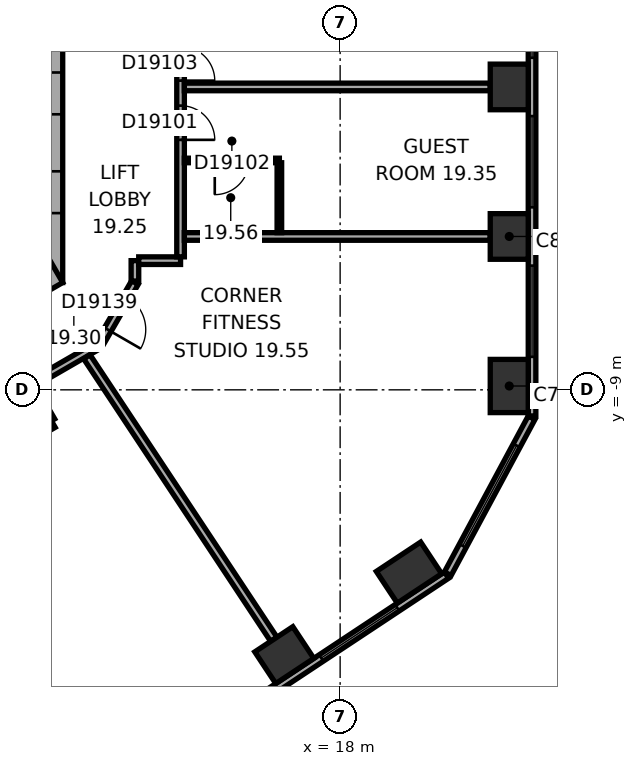
"""IFC4 building model, lengths in metres.
Left out: names, types, materials, properties, quantities, classifications, styles, units other than length and angle.
Written with IfcOpenShell. Run it as: python <this file> out.ifc"""

import sys

from ifc_helpers import new_model, si_unit, direction, frame, frame_2d, origin, origin_2d, place, context, subcontext, project, spatial, rectangle, extrude, element, fill, save


model = new_model("IFC4")
c1 = context("Model", 3, precision=1e-05, world=origin(), true_north=direction((0.0, 1.0)))
c2 = subcontext(c1, "Body", "Model", "MODEL_VIEW")
j1 = project(units=[si_unit("LENGTHUNIT", "METRE"), si_unit("PLANEANGLEUNIT", "RADIAN")], contexts=[c1])
p1 = place(None, origin())
s1 = spatial("IfcSite", under=j1, at=p1, CompositionType="ELEMENT")
p2 = place(p1, origin())
s2 = spatial("IfcBuilding", under=s1, at=p2, CompositionType="ELEMENT")
p3 = place(p2, frame((0.0, 0.0, 86.9)))
s3 = spatial("IfcBuildingStorey", under=s2, at=p3, CompositionType="ELEMENT", Elevation=86.9)
p4 = place(p3, frame((22.45, -8.899, 0.0), z_axis=(0.0, 0.0, 1.0), x_axis=(0.0, 1.0, 0.0)))
e1 = element("IfcColumn", 1, at=p4, inside=s3, PredefinedType="COLUMN", context=c2, shape_type="SweptSolid", body=[
    extrude(rectangle(XDim=1.4, YDim=1.0, at=origin_2d()), origin(), (0.0, 0.0, 1.0), 3.3),
])
for number, where, z_axis, x_axis in (
    (2, (22.45, -4.965, 0.0), (0.0, 0.0, 1.0), (0.0, 1.0, 0.0)),
    (3, (22.45, -1.03, 0.0), (0.0, 0.0, 1.0), (0.0, 1.0, 0.0)),
    (4, (16.531, -15.981, 0.0), (0.0, 0.0, 1.0), (0.834, 0.552, 0.0)),
):
    element("IfcColumn", number, at=place(p3, frame(where, z_axis=z_axis, x_axis=x_axis)), inside=s3, PredefinedType="COLUMN", context=c2, shape_type="SweptSolid", body=[
        extrude(rectangle(XDim=1.2, YDim=1.0, at=origin_2d()), origin(), (0.0, 0.0, 1.0), 3.3),
    ])
p5 = place(p3, frame((19.812, -13.809, 0.0), z_axis=(0.0, 0.0, 1.0), x_axis=(0.833885822067, 0.551936985312, 0.0)))
e5 = element("IfcColumn", 5, at=p5, inside=s3, PredefinedType="COLUMN", context=c2, shape_type="SweptSolid", body=[
    extrude(rectangle(XDim=1.4, YDim=1.0, at=origin_2d()), origin(), (0.0, 0.0, 1.0), 3.3),
])
p6 = place(p3, frame((10.1, -6.177, 0.0), z_axis=(0.0, 0.0, 1.0), x_axis=(0.0, 1.0, 0.0)))
e6 = element("IfcWall", 6, at=p6, inside=s3, PredefinedType="SHEAR", context=c2, shape_type="SweptSolid", body=[
    extrude(rectangle(XDim=12.355, YDim=1.2, at=frame_2d((6.177, 0.0))), origin(), (0.0, 0.0, 1.0), 3.3),
])
p7 = place(p6, frame((6.378, 0.0, 0.0)))
e7 = element("IfcOpeningElement", 7, at=p7, cuts=e6, PredefinedType="OPENING", context=c2, shape_type="SweptSolid", body=[
    extrude(rectangle(XDim=1.5, YDim=2.1, at=frame_2d((0.75, 1.05))), frame((0.0, 0.61, 0.0), z_axis=(0.0, -1.0, 0.0), x_axis=(1.0, 0.0, 0.0)), (0.0, 0.0, 1.0), 1.22),
])
p8 = place(p6, frame((1.828, 0.0, 0.0)))
e8 = element("IfcOpeningElement", 8, at=p8, cuts=e6, PredefinedType="OPENING", context=c2, shape_type="SweptSolid", body=[
    extrude(rectangle(XDim=1.1, YDim=2.1, at=frame_2d((0.55, 1.05))), frame((0.0, 0.61, 0.0), z_axis=(0.0, -1.0, 0.0), x_axis=(1.0, 0.0, 0.0)), (0.0, 0.0, 1.0), 1.22),
])
p9 = place(p6, frame((4.427, 0.0, 0.0)))
e9 = element("IfcOpeningElement", 9, at=p9, cuts=e6, PredefinedType="OPENING", context=c2, shape_type="SweptSolid", body=[
    extrude(rectangle(XDim=1.1, YDim=2.1, at=frame_2d((0.55, 1.05))), frame((0.0, 0.61, 0.0), z_axis=(0.0, -1.0, 0.0), x_axis=(1.0, 0.0, 0.0)), (0.0, 0.0, 1.0), 1.22),
])
p10 = place(p3, frame((-0.3, -11.836, 0.0), z_axis=(0.0, 0.0, 1.0), x_axis=(0.866021384402, 0.500006961711, 0.0)))
e10 = element("IfcWall", 10, at=p10, inside=s3, PredefinedType="SHEAR", context=c2, shape_type="SweptSolid", body=[
    extrude(rectangle(XDim=12.355, YDim=1.2, at=frame_2d((6.178, 0.0))), origin(), (0.0, 0.0, 1.0), 3.3),
])
p11 = place(p10, frame((4.128, 0.0, 0.0)))
e11 = element("IfcOpeningElement", 11, at=p11, cuts=e10, PredefinedType="OPENING", context=c2, shape_type="SweptSolid", body=[
    extrude(rectangle(XDim=0.9, YDim=2.1, at=frame_2d((0.45, 1.05))), frame((0.0, 0.61, 0.0), z_axis=(0.0, -1.0, 0.0), x_axis=(1.0, 0.0, 0.0)), (0.0, 0.0, 1.0), 1.22),
])
p12 = place(p10, frame((7.928, 0.0, 0.0)))
e12 = element("IfcOpeningElement", 12, at=p12, cuts=e10, PredefinedType="OPENING", context=c2, shape_type="SweptSolid", body=[
    extrude(rectangle(XDim=1.1, YDim=2.1, at=frame_2d((0.55, 1.05))), frame((0.0, 0.61, 0.0), z_axis=(0.0, -1.0, 0.0), x_axis=(1.0, 0.0, 0.0)), (0.0, 0.0, 1.0), 1.22),
])
p13 = place(p3, frame((23.05, -9.687, 0.0), z_axis=(0.0, 0.0, 1.0), x_axis=(0.0, 1.0, 0.0)))
e13 = element("IfcWall", 13, at=p13, inside=s3, PredefinedType="STANDARD", context=c2, shape_type="SweptSolid", body=[
    extrude(rectangle(XDim=21.246, YDim=0.2, at=frame_2d((10.623, 0.0))), origin(), (0.0, 0.0, 1.0), 3.3),
])
p14 = place(p13, frame((1.555, 0.0, 0.8)))
e14 = element("IfcOpeningElement", 14, at=p14, cuts=e13, PredefinedType="OPENING", context=c2, shape_type="SweptSolid", body=[
    extrude(rectangle(XDim=2.4, YDim=1.7, at=frame_2d((1.2, 0.85))), frame((0.0, 0.11, 0.0), z_axis=(0.0, -1.0, 0.0), x_axis=(1.0, 0.0, 0.0)), (0.0, 0.0, 1.0), 0.22),
])
p15 = place(p13, frame((5.489, 0.0, 0.8)))
e15 = element("IfcOpeningElement", 15, at=p15, cuts=e13, PredefinedType="OPENING", context=c2, shape_type="SweptSolid", body=[
    extrude(rectangle(XDim=2.4, YDim=1.7, at=frame_2d((1.2, 0.85))), frame((0.0, 0.11, 0.0), z_axis=(0.0, -1.0, 0.0), x_axis=(1.0, 0.0, 0.0)), (0.0, 0.0, 1.0), 0.22),
])
p16 = place(p13, frame((9.424, 0.0, 0.8)))
e16 = element("IfcOpeningElement", 16, at=p16, cuts=e13, PredefinedType="OPENING", context=c2, shape_type="SweptSolid", body=[
    extrude(rectangle(XDim=2.4, YDim=1.7, at=frame_2d((1.2, 0.85))), frame((0.0, 0.11, 0.0), z_axis=(0.0, -1.0, 0.0), x_axis=(1.0, 0.0, 0.0)), (0.0, 0.0, 1.0), 0.22),
])
p17 = place(p13, frame((13.358, 0.0, 0.8)))
e17 = element("IfcOpeningElement", 17, at=p17, cuts=e13, PredefinedType="OPENING", context=c2, shape_type="SweptSolid", body=[
    extrude(rectangle(XDim=2.4, YDim=1.7, at=frame_2d((1.2, 0.85))), frame((0.0, 0.11, 0.0), z_axis=(0.0, -1.0, 0.0), x_axis=(1.0, 0.0, 0.0)), (0.0, 0.0, 1.0), 0.22),
])
p18 = place(p13, frame((17.293, 0.0, 0.8)))
e18 = element("IfcOpeningElement", 18, at=p18, cuts=e13, PredefinedType="OPENING", context=c2, shape_type="SweptSolid", body=[
    extrude(rectangle(XDim=2.4, YDim=1.7, at=frame_2d((1.2, 0.85))), frame((0.0, 0.11, 0.0), z_axis=(0.0, -1.0, 0.0), x_axis=(1.0, 0.0, 0.0)), (0.0, 0.0, 1.0), 0.22),
])
p19 = place(p3, frame((3.083, -25.601, 0.0), z_axis=(0.0, 0.0, 1.0), x_axis=(0.833884295743, 0.551939291329, 0.0)))
e19 = element("IfcWall", 19, at=p19, inside=s3, PredefinedType="STANDARD", context=c2, shape_type="SweptSolid", body=[
    extrude(rectangle(XDim=21.246, YDim=0.2, at=frame_2d((10.623, 0.0))), origin(), (0.0, 0.0, 1.0), 3.3),
])
p20 = place(p19, frame((1.553, 0.0, 0.8)))
e20 = element("IfcOpeningElement", 20, at=p20, cuts=e19, PredefinedType="OPENING", context=c2, shape_type="SweptSolid", body=[
    extrude(rectangle(XDim=2.4, YDim=1.7, at=frame_2d((1.2, 0.85))), frame((0.0, 0.11, 0.0), z_axis=(0.0, -1.0, 0.0), x_axis=(1.0, 0.0, 0.0)), (0.0, 0.0, 1.0), 0.22),
])
p21 = place(p19, frame((5.488, 0.0, 0.8)))
e21 = element("IfcOpeningElement", 21, at=p21, cuts=e19, PredefinedType="OPENING", context=c2, shape_type="SweptSolid", body=[
    extrude(rectangle(XDim=2.4, YDim=1.7, at=frame_2d((1.2, 0.85))), frame((0.0, 0.11, 0.0), z_axis=(0.0, -1.0, 0.0), x_axis=(1.0, 0.0, 0.0)), (0.0, 0.0, 1.0), 0.22),
])
p22 = place(p19, frame((9.422, 0.0, 0.8)))
e22 = element("IfcOpeningElement", 22, at=p22, cuts=e19, PredefinedType="OPENING", context=c2, shape_type="SweptSolid", body=[
    extrude(rectangle(XDim=2.4, YDim=1.7, at=frame_2d((1.2, 0.85))), frame((0.0, 0.11, 0.0), z_axis=(0.0, -1.0, 0.0), x_axis=(1.0, 0.0, 0.0)), (0.0, 0.0, 1.0), 0.22),
])
p23 = place(p19, frame((13.357, 0.0, 0.8)))
e23 = element("IfcOpeningElement", 23, at=p23, cuts=e19, PredefinedType="OPENING", context=c2, shape_type="SweptSolid", body=[
    extrude(rectangle(XDim=2.4, YDim=1.7, at=frame_2d((1.2, 0.85))), frame((0.0, 0.11, 0.0), z_axis=(0.0, -1.0, 0.0), x_axis=(1.0, 0.0, 0.0)), (0.0, 0.0, 1.0), 0.22),
])
p24 = place(p19, frame((17.291, 0.0, 0.8)))
e24 = element("IfcOpeningElement", 24, at=p24, cuts=e19, PredefinedType="OPENING", context=c2, shape_type="SweptSolid", body=[
    extrude(rectangle(XDim=2.4, YDim=1.7, at=frame_2d((1.2, 0.85))), frame((0.0, 0.11, 0.0), z_axis=(0.0, -1.0, 0.0), x_axis=(1.0, 0.0, 0.0)), (0.0, 0.0, 1.0), 0.22),
])
p25 = place(p3, frame((20.833, -13.839, 0.0), z_axis=(0.0, 0.0, 1.0), x_axis=(0.473321668581, 0.880889662813, 0.0)))
e25 = element("IfcWall", 25, at=p25, inside=s3, PredefinedType="STANDARD", context=c2, shape_type="SweptSolid", body=[
    extrude(rectangle(XDim=4.66, YDim=0.2, at=frame_2d((2.33, 0.0))), origin(), (0.0, 0.0, 1.0), 3.3),
])
p26 = place(p25, frame((0.83, 0.0, 0.8)))
e26 = element("IfcOpeningElement", 26, at=p26, cuts=e25, PredefinedType="OPENING", context=c2, shape_type="SweptSolid", body=[
    extrude(rectangle(XDim=3.0, YDim=1.7, at=frame_2d((1.5, 0.85))), frame((0.0, 0.11, 0.0), z_axis=(0.0, -1.0, 0.0), x_axis=(1.0, 0.0, 0.0)), (0.0, 0.0, 1.0), 0.22),
])
p27 = place(p3, frame((7.419, -11.653, 0.0), z_axis=(0.0, 0.0, 1.0), x_axis=(0.866038154057, 0.49997791523, 0.0)))
e27 = element("IfcWall", 27, at=p27, inside=s3, PredefinedType="PARTITIONING", context=c2, shape_type="SweptSolid", body=[
    extrude(rectangle(XDim=3.502, YDim=0.2, at=frame_2d((1.751, 0.0))), origin(), (0.0, 0.0, 1.0), 3.05),
])
p28 = place(p3, frame((9.852, -8.861, 0.0), z_axis=(0.0, 0.0, 1.0), x_axis=(0.866013291437, 0.500020978615, 0.0)))
e28 = element("IfcWall", 28, at=p28, inside=s3, PredefinedType="PARTITIONING", context=c2, shape_type="SweptSolid", body=[
    extrude(rectangle(XDim=2.077, YDim=0.2, at=frame_2d((1.038, 0.0))), origin(), (0.0, 0.0, 1.0), 3.05),
])
p29 = place(p3, frame((10.402, -9.815, 0.0), z_axis=(0.0, 0.0, 1.0), x_axis=(-0.499968756647, 0.866043441391, 0.0)))
e29 = element("IfcWall", 29, at=p29, inside=s3, PredefinedType="PARTITIONING", context=c2, shape_type="SweptSolid", body=[
    extrude(rectangle(XDim=1.001, YDim=0.2, at=frame_2d((0.5, 0.0))), origin(), (0.0, 0.0, 1.0), 3.05),
])
p30 = place(p3, frame((11.67, -7.788, 0.0), z_axis=(0.0, 0.0, 1.0), x_axis=(0.500063286585, 0.865988862174, 0.0)))
e30 = element("IfcWall", 30, at=p30, inside=s3, PredefinedType="PARTITIONING", context=c2, shape_type="SweptSolid", body=[
    extrude(rectangle(XDim=1.86, YDim=0.2, at=frame_2d((0.93, 0.0))), origin(), (0.0, 0.0, 1.0), 3.05),
])
p31 = place(p30, frame((0.43, 0.0, 0.0)))
e31 = element("IfcOpeningElement", 31, at=p31, cuts=e30, PredefinedType="OPENING", context=c2, shape_type="SweptSolid", body=[
    extrude(rectangle(XDim=1.0, YDim=2.1, at=frame_2d((0.5, 1.05))), frame((0.0, 0.11, 0.0), z_axis=(0.0, -1.0, 0.0), x_axis=(1.0, 0.0, 0.0)), (0.0, 0.0, 1.0), 0.22),
])
p32 = place(p3, frame((12.6, -6.138, 0.0), z_axis=(0.0, 0.0, 1.0), x_axis=(0.0, 1.0, 0.0)))
e32 = element("IfcWall", 32, at=p32, inside=s3, PredefinedType="PARTITIONING", context=c2, shape_type="SweptSolid", body=[
    extrude(rectangle(XDim=0.537, YDim=0.2, at=frame_2d((0.268, 0.0))), origin(), (0.0, 0.0, 1.0), 3.05),
])
p33 = place(p3, frame((12.7, -5.601, 0.0), z_axis=(0.0, 0.0, 1.0), x_axis=(1.0, 0.0, 0.0)))
e33 = element("IfcWall", 33, at=p33, inside=s3, PredefinedType="PARTITIONING", context=c2, shape_type="SweptSolid", body=[
    extrude(rectangle(XDim=1.101, YDim=0.2, at=frame_2d((0.551, 0.0))), origin(), (0.0, 0.0, 1.0), 3.05),
])
p34 = place(p3, frame((13.801, -5.501, 0.0), z_axis=(0.0, 0.0, 1.0), x_axis=(0.0, 1.0, 0.0)))
e34 = element("IfcWall", 34, at=p34, inside=s3, PredefinedType="PARTITIONING", context=c2, shape_type="SweptSolid", body=[
    extrude(rectangle(XDim=5.702, YDim=0.2, at=frame_2d((2.851, 0.0))), origin(), (0.0, 0.0, 1.0), 3.05),
])
p35 = place(p34, frame((3.079, 0.0, 0.0)))
e35 = element("IfcOpeningElement", 35, at=p35, cuts=e34, PredefinedType="OPENING", context=c2, shape_type="SweptSolid", body=[
    extrude(rectangle(XDim=0.9, YDim=2.1, at=frame_2d((0.45, 1.05))), frame((0.0, 0.11, 0.0), z_axis=(0.0, -1.0, 0.0), x_axis=(1.0, 0.0, 0.0)), (0.0, 0.0, 1.0), 0.22),
])
p36 = place(p34, frame((4.636, 0.0, 0.0)))
e36 = element("IfcOpeningElement", 36, at=p36, cuts=e34, PredefinedType="OPENING", context=c2, shape_type="SweptSolid", body=[
    extrude(rectangle(XDim=0.9, YDim=2.1, at=frame_2d((0.45, 1.05))), frame((0.0, 0.11, 0.0), z_axis=(0.0, -1.0, 0.0), x_axis=(1.0, 0.0, 0.0)), (0.0, 0.0, 1.0), 0.22),
])
p37 = place(p3, frame((13.901, -4.965, 0.0), z_axis=(0.0, 0.0, 1.0), x_axis=(1.0, 0.0, 0.0)))
e37 = element("IfcWall", 37, at=p37, inside=s3, PredefinedType="PARTITIONING", context=c2, shape_type="SweptSolid", body=[
    extrude(rectangle(XDim=8.049, YDim=0.2, at=frame_2d((4.024, 0.0))), origin(), (0.0, 0.0, 1.0), 3.05),
])
p38 = place(p3, frame((13.901, -2.965, 0.0), z_axis=(0.0, 0.0, 1.0), x_axis=(1.0, 0.0, 0.0)))
e38 = element("IfcWall", 38, at=p38, inside=s3, PredefinedType="PARTITIONING", context=c2, shape_type="SweptSolid", body=[
    extrude(rectangle(XDim=2.5, YDim=0.12, at=frame_2d((1.25, 0.0))), origin(), (0.0, 0.0, 1.0), 3.05),
])
p39 = place(p38, frame((0.8, 0.0, 0.0)))
e39 = element("IfcOpeningElement", 39, at=p39, cuts=e38, PredefinedType="OPENING", context=c2, shape_type="SweptSolid", body=[
    extrude(rectangle(XDim=0.9, YDim=2.1, at=frame_2d((0.45, 1.05))), frame((0.0, 0.07, 0.0), z_axis=(0.0, -1.0, 0.0), x_axis=(1.0, 0.0, 0.0)), (0.0, 0.0, 1.0), 0.14),
])
p40 = place(p3, frame((16.255, -15.564, 0.0), z_axis=(0.0, 0.0, 1.0), x_axis=(-0.55192208744, 0.833895682562, 0.0)))
e40 = element("IfcWall", 40, at=p40, inside=s3, PredefinedType="PARTITIONING", context=c2, shape_type="SweptSolid", body=[
    extrude(rectangle(XDim=8.913, YDim=0.2, at=frame_2d((4.457, 0.0))), origin(), (0.0, 0.0, 1.0), 2.6),
])
p41 = place(p3, frame((16.401, -3.025, 0.0), z_axis=(0.0, 0.0, 1.0), x_axis=(0.0, -1.0, 0.0)))
e41 = element("IfcWall", 41, at=p41, inside=s3, PredefinedType="PARTITIONING", context=c2, shape_type="SweptSolid", body=[
    extrude(rectangle(XDim=1.84, YDim=0.12, at=frame_2d((0.92, 0.0))), origin(), (0.0, 0.0, 1.0), 3.05),
])
p42 = place(p3, frame((21.95, -1.03, 0.0), z_axis=(0.0, 0.0, 1.0), x_axis=(-1.0, 0.0, 0.0)))
e42 = element("IfcWall", 42, at=p42, inside=s3, PredefinedType="PARTITIONING", context=c2, shape_type="SweptSolid", body=[
    extrude(rectangle(XDim=8.049, YDim=0.2, at=frame_2d((4.024, 0.0))), origin(), (0.0, 0.0, 1.0), 2.6),
])
p43 = place(p14, origin())
e43 = element("IfcWindow", 43, at=p43, inside=s3, PartitioningType="SINGLE_PANEL", PredefinedType="WINDOW", context=c2, shape_type="SweptSolid", body=[
    extrude(rectangle(XDim=2.4, YDim=1.7, at=frame_2d((1.2, 0.85))), frame((0.0, 0.03, 0.0), z_axis=(0.0, -1.0, 0.0), x_axis=(1.0, 0.0, 0.0)), (0.0, 0.0, 1.0), 0.06),
])
fill(e14, e43)
p44 = place(p15, origin())
e44 = element("IfcWindow", 44, at=p44, inside=s3, PartitioningType="SINGLE_PANEL", PredefinedType="WINDOW", context=c2, shape_type="SweptSolid", body=[
    extrude(rectangle(XDim=2.4, YDim=1.7, at=frame_2d((1.2, 0.85))), frame((0.0, 0.03, 0.0), z_axis=(0.0, -1.0, 0.0), x_axis=(1.0, 0.0, 0.0)), (0.0, 0.0, 1.0), 0.06),
])
fill(e15, e44)
p45 = place(p16, origin())
e45 = element("IfcWindow", 45, at=p45, inside=s3, PartitioningType="SINGLE_PANEL", PredefinedType="WINDOW", context=c2, shape_type="SweptSolid", body=[
    extrude(rectangle(XDim=2.4, YDim=1.7, at=frame_2d((1.2, 0.85))), frame((0.0, 0.03, 0.0), z_axis=(0.0, -1.0, 0.0), x_axis=(1.0, 0.0, 0.0)), (0.0, 0.0, 1.0), 0.06),
])
fill(e16, e45)
p46 = place(p24, origin())
e46 = element("IfcWindow", 46, at=p46, inside=s3, PartitioningType="SINGLE_PANEL", PredefinedType="WINDOW", context=c2, shape_type="SweptSolid", body=[
    extrude(rectangle(XDim=2.4, YDim=1.7, at=frame_2d((1.2, 0.85))), frame((0.0, 0.03, 0.0), z_axis=(0.0, -1.0, 0.0), x_axis=(1.0, 0.0, 0.0)), (0.0, 0.0, 1.0), 0.06),
])
fill(e24, e46)
p47 = place(p26, origin())
e47 = element("IfcWindow", 47, at=p47, inside=s3, PartitioningType="SINGLE_PANEL", PredefinedType="WINDOW", context=c2, shape_type="SweptSolid", body=[
    extrude(rectangle(XDim=3.0, YDim=1.7, at=frame_2d((1.5, 0.85))), frame((0.0, 0.03, 0.0), z_axis=(0.0, -1.0, 0.0), x_axis=(1.0, 0.0, 0.0)), (0.0, 0.0, 1.0), 0.06),
])
fill(e26, e47)
p48 = place(p35, origin())
e48 = element("IfcDoor", 48, at=p48, inside=s3, OperationType="SINGLE_SWING_LEFT", PredefinedType="DOOR", context=c2, shape_type="SweptSolid", body=[
    extrude(rectangle(XDim=0.9, YDim=2.1, at=frame_2d((0.45, 1.05))), frame((0.0, 0.025, 0.0), z_axis=(0.0, -1.0, 0.0), x_axis=(1.0, 0.0, 0.0)), (0.0, 0.0, 1.0), 0.05),
])
fill(e35, e48)
p49 = place(p39, origin())
e49 = element("IfcDoor", 49, at=p49, inside=s3, OperationType="SINGLE_SWING_LEFT", PredefinedType="DOOR", context=c2, shape_type="SweptSolid", body=[
    extrude(rectangle(XDim=0.9, YDim=2.1, at=frame_2d((0.45, 1.05))), frame((0.0, 0.025, 0.0), z_axis=(0.0, -1.0, 0.0), x_axis=(1.0, 0.0, 0.0)), (0.0, 0.0, 1.0), 0.05),
])
fill(e39, e49)
p50 = place(p36, origin())
e50 = element("IfcDoor", 50, at=p50, inside=s3, OperationType="SINGLE_SWING_LEFT", PredefinedType="DOOR", context=c2, shape_type="SweptSolid", body=[
    extrude(rectangle(XDim=0.9, YDim=2.1, at=frame_2d((0.45, 1.05))), frame((0.0, 0.025, 0.0), z_axis=(0.0, -1.0, 0.0), x_axis=(1.0, 0.0, 0.0)), (0.0, 0.0, 1.0), 0.05),
])
fill(e36, e50)
p51 = place(p31, origin())
e51 = element("IfcDoor", 51, at=p51, inside=s3, OperationType="SINGLE_SWING_LEFT", PredefinedType="DOOR", context=c2, shape_type="SweptSolid", body=[
    extrude(rectangle(XDim=1.0, YDim=2.1, at=frame_2d((0.5, 1.05))), frame((0.0, 0.025, 0.0), z_axis=(0.0, -1.0, 0.0), x_axis=(1.0, 0.0, 0.0)), (0.0, 0.0, 1.0), 0.05),
])
fill(e31, e51)
save(model, sys.argv[1])
